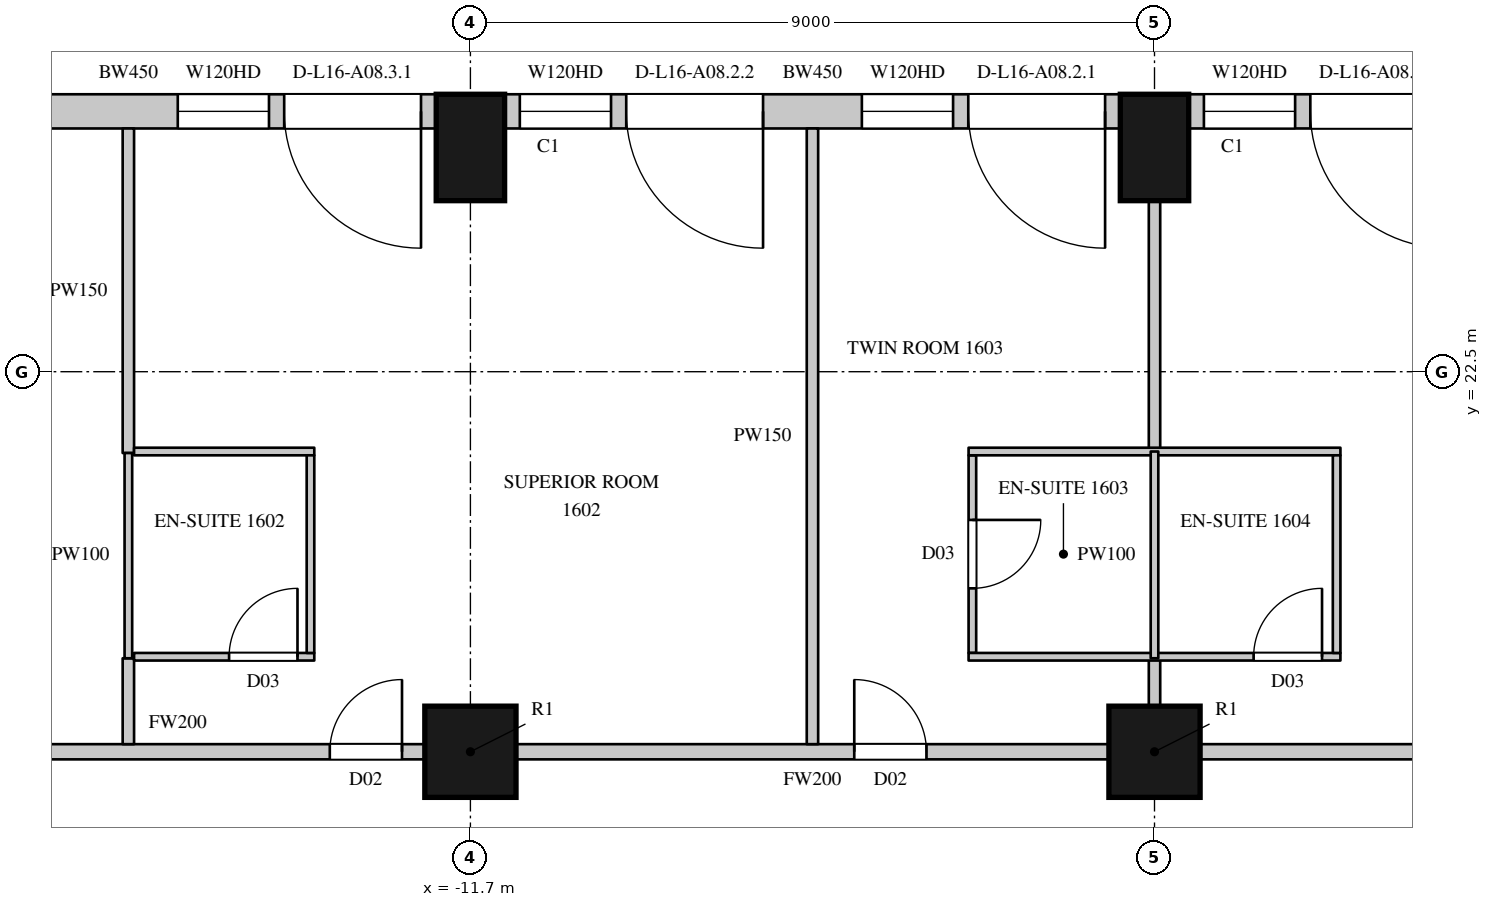
"""IFC4 building model, lengths in metres.
Left out: names, types, materials, properties, quantities, classifications, styles, units other than length and angle.
Written with IfcOpenShell. Run it as: python <this file> out.ifc"""

import sys

from ifc_helpers import new_model, si_unit, direction, frame, frame_2d, origin, origin_2d, place, context, subcontext, project, spatial, rectangle, circle, extrude, element, fill, save


model = new_model("IFC4")
c1 = context("Model", 3, precision=1e-05, world=origin(), true_north=direction((0.0, 1.0)))
c2 = subcontext(c1, "Body", "Model", "MODEL_VIEW")
j1 = project(units=[si_unit("LENGTHUNIT", "METRE"), si_unit("PLANEANGLEUNIT", "RADIAN")], contexts=[c1])
p1 = place(None, origin())
s1 = spatial("IfcSite", under=j1, at=p1, CompositionType="ELEMENT")
p2 = place(p1, origin())
s2 = spatial("IfcBuilding", under=s1, at=p2, CompositionType="ELEMENT")
p3 = place(p2, frame((0.0, 0.0, 87.9)))
s3 = spatial("IfcBuildingStorey", under=s2, at=p3, CompositionType="ELEMENT", Elevation=87.9)
for number, where, z_axis, x_axis in (
    (1, (-2.7, 25.45, 0.0), (0.0, 0.0, 1.0), (-1.0, 0.0, 0.0)),
    (2, (-11.7, 25.45, 0.0), (0.0, 0.0, 1.0), (-1.0, 0.0, 0.0)),
):
    element("IfcColumn", number, at=place(p3, frame(where, z_axis=z_axis, x_axis=x_axis)), inside=s3, PredefinedType="COLUMN", context=c2, shape_type="SweptSolid", body=[
        extrude(rectangle(XDim=0.9, YDim=1.4, at=origin_2d()), origin(), (0.0, 0.0, 1.0), 3.6),
    ])
for number, where, z_axis, x_axis in (
    (3, (-11.7, 17.5, 0.0), (0.0, 0.0, 1.0), (1.0, 0.0, 0.0)),
    (4, (-2.7, 17.5, 0.0), (0.0, 0.0, 1.0), (1.0, 0.0, 0.0)),
):
    element("IfcColumn", number, at=place(p3, frame(where, z_axis=z_axis, x_axis=x_axis)), inside=s3, PredefinedType="COLUMN", context=c2, shape_type="SweptSolid", body=[
        extrude(circle(Radius=0.6, at=origin_2d()), origin(), (0.0, 0.0, 1.0), 3.6),
    ])
p4 = place(p3, frame((5.85, 25.925, 0.0), z_axis=(0.0, 0.0, 1.0), x_axis=(-1.0, 0.0, 0.0)))
e5 = element("IfcWall", 5, at=p4, inside=s3, PredefinedType="SOLIDWALL", context=c2, shape_type="SweptSolid", body=[
    extrude(rectangle(XDim=8.1, YDim=0.45, at=frame_2d((4.05, 0.0))), origin(), (0.0, 0.0, 1.0), 3.3),
])
p5 = place(p4, frame((0.2, 0.0, 0.0)))
e6 = element("IfcOpeningElement", 6, at=p5, cuts=e5, PredefinedType="OPENING", context=c2, shape_type="SweptSolid", body=[
    extrude(rectangle(XDim=1.8, YDim=2.4, at=frame_2d((0.9, 1.2))), frame((0.0, 0.235, 0.0), z_axis=(0.0, -1.0, 0.0), x_axis=(1.0, 0.0, 0.0)), (0.0, 0.0, 1.0), 0.47),
])
p6 = place(p4, frame((2.2, 0.0, 1.05)))
e7 = element("IfcOpeningElement", 7, at=p6, cuts=e5, PredefinedType="OPENING", context=c2, shape_type="SweptSolid", body=[
    extrude(rectangle(XDim=1.2, YDim=2.0, at=frame_2d((0.6, 1.0))), frame((0.0, 0.235, 0.0), z_axis=(0.0, -1.0, 0.0), x_axis=(1.0, 0.0, 0.0)), (0.0, 0.0, 1.0), 0.47),
])
p7 = place(p4, frame((4.7, 0.0, 0.0)))
e8 = element("IfcOpeningElement", 8, at=p7, cuts=e5, PredefinedType="OPENING", context=c2, shape_type="SweptSolid", body=[
    extrude(rectangle(XDim=1.8, YDim=2.4, at=frame_2d((0.9, 1.2))), frame((0.0, 0.235, 0.0), z_axis=(0.0, -1.0, 0.0), x_axis=(1.0, 0.0, 0.0)), (0.0, 0.0, 1.0), 0.47),
])
p8 = place(p4, frame((6.7, 0.0, 1.05)))
e9 = element("IfcOpeningElement", 9, at=p8, cuts=e5, PredefinedType="OPENING", context=c2, shape_type="SweptSolid", body=[
    extrude(rectangle(XDim=1.2, YDim=2.0, at=frame_2d((0.6, 1.0))), frame((0.0, 0.235, 0.0), z_axis=(0.0, -1.0, 0.0), x_axis=(1.0, 0.0, 0.0)), (0.0, 0.0, 1.0), 0.47),
])
p9 = place(p3, frame((-3.15, 25.925, 0.0), z_axis=(0.0, 0.0, 1.0), x_axis=(-1.0, 0.0, 0.0)))
e10 = element("IfcWall", 10, at=p9, inside=s3, PredefinedType="SOLIDWALL", context=c2, shape_type="SweptSolid", body=[
    extrude(rectangle(XDim=8.1, YDim=0.45, at=frame_2d((4.05, 0.0))), origin(), (0.0, 0.0, 1.0), 3.3),
])
p10 = place(p9, frame((0.2, 0.0, 0.0)))
e11 = element("IfcOpeningElement", 11, at=p10, cuts=e10, PredefinedType="OPENING", context=c2, shape_type="SweptSolid", body=[
    extrude(rectangle(XDim=1.8, YDim=2.4, at=frame_2d((0.9, 1.2))), frame((0.0, 0.235, 0.0), z_axis=(0.0, -1.0, 0.0), x_axis=(1.0, 0.0, 0.0)), (0.0, 0.0, 1.0), 0.47),
])
p11 = place(p9, frame((2.2, 0.0, 1.05)))
e12 = element("IfcOpeningElement", 12, at=p11, cuts=e10, PredefinedType="OPENING", context=c2, shape_type="SweptSolid", body=[
    extrude(rectangle(XDim=1.2, YDim=2.0, at=frame_2d((0.6, 1.0))), frame((0.0, 0.235, 0.0), z_axis=(0.0, -1.0, 0.0), x_axis=(1.0, 0.0, 0.0)), (0.0, 0.0, 1.0), 0.47),
])
p12 = place(p9, frame((4.7, 0.0, 0.0)))
e13 = element("IfcOpeningElement", 13, at=p12, cuts=e10, PredefinedType="OPENING", context=c2, shape_type="SweptSolid", body=[
    extrude(rectangle(XDim=1.8, YDim=2.4, at=frame_2d((0.9, 1.2))), frame((0.0, 0.235, 0.0), z_axis=(0.0, -1.0, 0.0), x_axis=(1.0, 0.0, 0.0)), (0.0, 0.0, 1.0), 0.47),
])
p13 = place(p9, frame((6.7, 0.0, 1.05)))
e14 = element("IfcOpeningElement", 14, at=p13, cuts=e10, PredefinedType="OPENING", context=c2, shape_type="SweptSolid", body=[
    extrude(rectangle(XDim=1.2, YDim=2.0, at=frame_2d((0.6, 1.0))), frame((0.0, 0.235, 0.0), z_axis=(0.0, -1.0, 0.0), x_axis=(1.0, 0.0, 0.0)), (0.0, 0.0, 1.0), 0.47),
])
p14 = place(p3, frame((-12.15, 25.925, 0.0), z_axis=(0.0, 0.0, 1.0), x_axis=(-1.0, 0.0, 0.0)))
e15 = element("IfcWall", 15, at=p14, inside=s3, PredefinedType="SOLIDWALL", context=c2, shape_type="SweptSolid", body=[
    extrude(rectangle(XDim=8.1, YDim=0.45, at=frame_2d((4.05, 0.0))), origin(), (0.0, 0.0, 1.0), 3.3),
])
p15 = place(p14, frame((0.2, 0.0, 0.0)))
e16 = element("IfcOpeningElement", 16, at=p15, cuts=e15, PredefinedType="OPENING", context=c2, shape_type="SweptSolid", body=[
    extrude(rectangle(XDim=1.8, YDim=2.4, at=frame_2d((0.9, 1.2))), frame((0.0, 0.235, 0.0), z_axis=(0.0, -1.0, 0.0), x_axis=(1.0, 0.0, 0.0)), (0.0, 0.0, 1.0), 0.47),
])
p16 = place(p14, frame((2.2, 0.0, 1.05)))
e17 = element("IfcOpeningElement", 17, at=p16, cuts=e15, PredefinedType="OPENING", context=c2, shape_type="SweptSolid", body=[
    extrude(rectangle(XDim=1.2, YDim=2.0, at=frame_2d((0.6, 1.0))), frame((0.0, 0.235, 0.0), z_axis=(0.0, -1.0, 0.0), x_axis=(1.0, 0.0, 0.0)), (0.0, 0.0, 1.0), 0.47),
])
p17 = place(p14, frame((5.4, 0.0, 0.0)))
e18 = element("IfcOpeningElement", 18, at=p17, cuts=e15, PredefinedType="OPENING", context=c2, shape_type="SweptSolid", body=[
    extrude(rectangle(XDim=1.8, YDim=2.4, at=frame_2d((0.9, 1.2))), frame((0.0, 0.235, 0.0), z_axis=(0.0, -1.0, 0.0), x_axis=(1.0, 0.0, 0.0)), (0.0, 0.0, 1.0), 0.47),
])
p18 = place(p3, frame((-18.8, 17.5, 0.0), z_axis=(0.0, 0.0, 1.0), x_axis=(1.0, 0.0, 0.0)))
e19 = element("IfcWall", 19, at=p18, inside=s3, PredefinedType="PARTITIONING", context=c2, shape_type="SweptSolid", body=[
    extrude(rectangle(XDim=6.5, YDim=0.2, at=frame_2d((3.25, 0.0))), origin(), (0.0, 0.0, 1.0), 2.75),
])
p19 = place(p18, frame((5.25, 0.0, 0.0)))
e20 = element("IfcOpeningElement", 20, at=p19, cuts=e19, PredefinedType="OPENING", context=c2, shape_type="SweptSolid", body=[
    extrude(rectangle(XDim=0.95, YDim=2.2, at=frame_2d((0.475, 1.1))), frame((0.0, 0.11, 0.0), z_axis=(0.0, -1.0, 0.0), x_axis=(1.0, 0.0, 0.0)), (0.0, 0.0, 1.0), 0.22),
])
p20 = place(p3, frame((-11.1, 17.5, 0.0), z_axis=(0.0, 0.0, 1.0), x_axis=(1.0, 0.0, 0.0)))
e21 = element("IfcWall", 21, at=p20, inside=s3, PredefinedType="PARTITIONING", context=c2, shape_type="SweptSolid", body=[
    extrude(rectangle(XDim=7.8, YDim=0.2, at=frame_2d((3.9, 0.0))), origin(), (0.0, 0.0, 1.0), 2.75),
])
p21 = place(p20, frame((4.45, 0.0, 0.0)))
e22 = element("IfcOpeningElement", 22, at=p21, cuts=e21, PredefinedType="OPENING", context=c2, shape_type="SweptSolid", body=[
    extrude(rectangle(XDim=0.95, YDim=2.2, at=frame_2d((0.475, 1.1))), frame((0.0, 0.11, 0.0), z_axis=(0.0, -1.0, 0.0), x_axis=(1.0, 0.0, 0.0)), (0.0, 0.0, 1.0), 0.22),
])
p22 = place(p3, frame((-2.1, 17.5, 0.0), z_axis=(0.0, 0.0, 1.0), x_axis=(1.0, 0.0, 0.0)))
e23 = element("IfcWall", 23, at=p22, inside=s3, PredefinedType="PARTITIONING", context=c2, shape_type="SweptSolid", body=[
    extrude(rectangle(XDim=7.8, YDim=0.2, at=frame_2d((3.9, 0.0))), origin(), (0.0, 0.0, 1.0), 2.75),
])
p23 = place(p22, frame((4.15, 0.0, 0.0)))
e24 = element("IfcOpeningElement", 24, at=p23, cuts=e23, PredefinedType="OPENING", context=c2, shape_type="SweptSolid", body=[
    extrude(rectangle(XDim=0.95, YDim=2.2, at=frame_2d((0.475, 1.1))), frame((0.0, 0.11, 0.0), z_axis=(0.0, -1.0, 0.0), x_axis=(1.0, 0.0, 0.0)), (0.0, 0.0, 1.0), 0.22),
])
p24 = place(p3, frame((-16.2, 17.6, 0.0), z_axis=(0.0, 0.0, 1.0), x_axis=(0.0, 1.0, 0.0)))
e25 = element("IfcWall", 25, at=p24, inside=s3, PredefinedType="PARTITIONING", context=c2, shape_type="SweptSolid", body=[
    extrude(rectangle(XDim=1.13, YDim=0.15, at=frame_2d((0.565, 0.0))), origin(), (0.0, 0.0, 1.0), 2.65),
])
p25 = place(p3, frame((-16.2, 21.43, 0.0), z_axis=(0.0, 0.0, 1.0), x_axis=(0.0, 1.0, 0.0)))
e26 = element("IfcWall", 26, at=p25, inside=s3, PredefinedType="PARTITIONING", context=c2, shape_type="SweptSolid", body=[
    extrude(rectangle(XDim=4.27, YDim=0.15, at=frame_2d((2.135, 0.0))), origin(), (0.0, 0.0, 1.0), 2.65),
])
p26 = place(p3, frame((-7.2, 17.6, 0.0), z_axis=(0.0, 0.0, 1.0), x_axis=(0.0, 1.0, 0.0)))
e27 = element("IfcWall", 27, at=p26, inside=s3, PredefinedType="PARTITIONING", context=c2, shape_type="SweptSolid", body=[
    extrude(rectangle(XDim=8.1, YDim=0.15, at=frame_2d((4.05, 0.0))), origin(), (0.0, 0.0, 1.0), 2.65),
])
p27 = place(p3, frame((-2.7, 18.1, 0.0), z_axis=(0.0, 0.0, 1.0), x_axis=(0.0, 1.0, 0.0)))
e28 = element("IfcWall", 28, at=p27, inside=s3, PredefinedType="PARTITIONING", context=c2, shape_type="SweptSolid", body=[
    extrude(rectangle(XDim=0.63, YDim=0.15, at=frame_2d((0.315, 0.0))), origin(), (0.0, 0.0, 1.0), 2.75),
])
p28 = place(p3, frame((-2.7, 21.45, 0.0), z_axis=(0.0, 0.0, 1.0), x_axis=(0.0, 1.0, 0.0)))
e29 = element("IfcWall", 29, at=p28, inside=s3, PredefinedType="PARTITIONING", context=c2, shape_type="SweptSolid", body=[
    extrude(rectangle(XDim=3.3, YDim=0.15, at=frame_2d((1.65, 0.0))), origin(), (0.0, 0.0, 1.0), 2.75),
])
p29 = place(p3, frame((-16.2, 18.73, 0.0), z_axis=(0.0, 0.0, 1.0), x_axis=(0.0, 1.0, 0.0)))
e30 = element("IfcWall", 30, at=p29, inside=s3, PredefinedType="PARTITIONING", context=c2, shape_type="SweptSolid", body=[
    extrude(rectangle(XDim=2.7, YDim=0.1, at=frame_2d((1.35, 0.0))), origin(), (0.0, 0.0, 1.0), 2.65),
])
p30 = place(p3, frame((-16.125, 18.75, 0.0), z_axis=(0.0, 0.0, 1.0), x_axis=(1.0, 0.0, 0.0)))
e31 = element("IfcWall", 31, at=p30, inside=s3, PredefinedType="PARTITIONING", context=c2, shape_type="SweptSolid", body=[
    extrude(rectangle(XDim=2.371, YDim=0.1, at=frame_2d((1.186, 0.0))), origin(), (0.0, 0.0, 1.0), 3.3),
])
p31 = place(p30, frame((1.25, 0.0, 0.0)))
e32 = element("IfcOpeningElement", 32, at=p31, cuts=e31, PredefinedType="OPENING", context=c2, shape_type="SweptSolid", body=[
    extrude(rectangle(XDim=0.9, YDim=2.2, at=frame_2d((0.45, 1.1))), frame((0.0, 0.06, 0.0), z_axis=(0.0, -1.0, 0.0), x_axis=(1.0, 0.0, 0.0)), (0.0, 0.0, 1.0), 0.12),
])
p32 = place(p3, frame((-16.125, 21.45, 0.0), z_axis=(0.0, 0.0, 1.0), x_axis=(1.0, 0.0, 0.0)))
e33 = element("IfcWall", 33, at=p32, inside=s3, PredefinedType="PARTITIONING", context=c2, shape_type="SweptSolid", body=[
    extrude(rectangle(XDim=2.371, YDim=0.1, at=frame_2d((1.186, 0.0))), origin(), (0.0, 0.0, 1.0), 3.3),
])
p33 = place(p3, frame((-13.804, 18.8, 0.0), z_axis=(0.0, 0.0, 1.0), x_axis=(0.0, 1.0, 0.0)))
e34 = element("IfcWall", 34, at=p33, inside=s3, PredefinedType="PARTITIONING", context=c2, shape_type="SweptSolid", body=[
    extrude(rectangle(XDim=2.6, YDim=0.1, at=frame_2d((1.3, 0.0))), origin(), (0.0, 0.0, 1.0), 3.3),
])
p34 = place(p3, frame((-5.096, 18.8, 0.0), z_axis=(0.0, 0.0, 1.0), x_axis=(0.0, 1.0, 0.0)))
e35 = element("IfcWall", 35, at=p34, inside=s3, PredefinedType="PARTITIONING", context=c2, shape_type="SweptSolid", body=[
    extrude(rectangle(XDim=2.6, YDim=0.1, at=frame_2d((1.3, 0.0))), origin(), (0.0, 0.0, 1.0), 3.3),
])
p35 = place(p34, frame((0.85, 0.0, 0.0)))
e36 = element("IfcOpeningElement", 36, at=p35, cuts=e35, PredefinedType="OPENING", context=c2, shape_type="SweptSolid", body=[
    extrude(rectangle(XDim=0.9, YDim=2.2, at=frame_2d((0.45, 1.1))), frame((0.0, 0.06, 0.0), z_axis=(0.0, -1.0, 0.0), x_axis=(1.0, 0.0, 0.0)), (0.0, 0.0, 1.0), 0.12),
])
p36 = place(p3, frame((-5.146, 18.75, 0.0), z_axis=(0.0, 0.0, 1.0), x_axis=(1.0, 0.0, 0.0)))
e37 = element("IfcWall", 37, at=p36, inside=s3, PredefinedType="PARTITIONING", context=c2, shape_type="SweptSolid", body=[
    extrude(rectangle(XDim=4.892, YDim=0.1, at=frame_2d((2.446, 0.0))), origin(), (0.0, 0.0, 1.0), 3.3),
])
p37 = place(p36, frame((3.75, 0.0, 0.0)))
e38 = element("IfcOpeningElement", 38, at=p37, cuts=e37, PredefinedType="OPENING", context=c2, shape_type="SweptSolid", body=[
    extrude(rectangle(XDim=0.9, YDim=2.2, at=frame_2d((0.45, 1.1))), frame((0.0, 0.06, 0.0), z_axis=(0.0, -1.0, 0.0), x_axis=(1.0, 0.0, 0.0)), (0.0, 0.0, 1.0), 0.12),
])
p38 = place(p3, frame((-5.146, 21.45, 0.0), z_axis=(0.0, 0.0, 1.0), x_axis=(1.0, 0.0, 0.0)))
e39 = element("IfcWall", 39, at=p38, inside=s3, PredefinedType="PARTITIONING", context=c2, shape_type="SweptSolid", body=[
    extrude(rectangle(XDim=4.892, YDim=0.1, at=frame_2d((2.446, 0.0))), origin(), (0.0, 0.0, 1.0), 3.3),
])
p39 = place(p3, frame((-2.7, 18.73, 0.0), z_axis=(0.0, 0.0, 1.0), x_axis=(0.0, 1.0, 0.0)))
e40 = element("IfcWall", 40, at=p39, inside=s3, PredefinedType="PARTITIONING", context=c2, shape_type="SweptSolid", body=[
    extrude(rectangle(XDim=2.72, YDim=0.1, at=frame_2d((1.36, 0.0))), origin(), (0.0, 0.0, 1.0), 2.75),
])
p40 = place(p3, frame((-0.304, 18.8, 0.0), z_axis=(0.0, 0.0, 1.0), x_axis=(0.0, 1.0, 0.0)))
e41 = element("IfcWall", 41, at=p40, inside=s3, PredefinedType="PARTITIONING", context=c2, shape_type="SweptSolid", body=[
    extrude(rectangle(XDim=2.6, YDim=0.1, at=frame_2d((1.3, 0.0))), origin(), (0.0, 0.0, 1.0), 3.3),
])
p41 = place(p7, origin())
e42 = element("IfcDoor", 42, at=p41, inside=s3, OperationType="SLIDING_TO_LEFT", PredefinedType="DOOR", context=c2, shape_type="SweptSolid", body=[
    extrude(rectangle(XDim=1.8, YDim=2.4, at=frame_2d((0.9, 1.2))), frame((0.0, 0.13, 0.0), z_axis=(0.0, -1.0, 0.0), x_axis=(1.0, 0.0, 0.0)), (0.0, 0.0, 1.0), 0.05),
])
fill(e8, e42)
p42 = place(p8, origin())
e43 = element("IfcWindow", 43, at=p42, inside=s3, PartitioningType="SINGLE_PANEL", PredefinedType="WINDOW", context=c2, shape_type="SweptSolid", body=[
    extrude(rectangle(XDim=1.2, YDim=2.0, at=frame_2d((0.6, 1.0))), frame((0.0, 0.135, 0.0), z_axis=(0.0, -1.0, 0.0), x_axis=(1.0, 0.0, 0.0)), (0.0, 0.0, 1.0), 0.06),
])
fill(e9, e43)
p43 = place(p10, origin())
e44 = element("IfcDoor", 44, at=p43, inside=s3, OperationType="SLIDING_TO_LEFT", PredefinedType="DOOR", context=c2, shape_type="SweptSolid", body=[
    extrude(rectangle(XDim=1.8, YDim=2.4, at=frame_2d((0.9, 1.2))), frame((0.0, 0.13, 0.0), z_axis=(0.0, -1.0, 0.0), x_axis=(1.0, 0.0, 0.0)), (0.0, 0.0, 1.0), 0.05),
])
fill(e11, e44)
p44 = place(p11, origin())
e45 = element("IfcWindow", 45, at=p44, inside=s3, PartitioningType="SINGLE_PANEL", PredefinedType="WINDOW", context=c2, shape_type="SweptSolid", body=[
    extrude(rectangle(XDim=1.2, YDim=2.0, at=frame_2d((0.6, 1.0))), frame((0.0, 0.135, 0.0), z_axis=(0.0, -1.0, 0.0), x_axis=(1.0, 0.0, 0.0)), (0.0, 0.0, 1.0), 0.06),
])
fill(e12, e45)
p45 = place(p12, origin())
e46 = element("IfcDoor", 46, at=p45, inside=s3, OperationType="SLIDING_TO_LEFT", PredefinedType="DOOR", context=c2, shape_type="SweptSolid", body=[
    extrude(rectangle(XDim=1.8, YDim=2.4, at=frame_2d((0.9, 1.2))), frame((0.0, 0.13, 0.0), z_axis=(0.0, -1.0, 0.0), x_axis=(1.0, 0.0, 0.0)), (0.0, 0.0, 1.0), 0.05),
])
fill(e13, e46)
p46 = place(p13, origin())
e47 = element("IfcWindow", 47, at=p46, inside=s3, PartitioningType="SINGLE_PANEL", PredefinedType="WINDOW", context=c2, shape_type="SweptSolid", body=[
    extrude(rectangle(XDim=1.2, YDim=2.0, at=frame_2d((0.6, 1.0))), frame((0.0, 0.135, 0.0), z_axis=(0.0, -1.0, 0.0), x_axis=(1.0, 0.0, 0.0)), (0.0, 0.0, 1.0), 0.06),
])
fill(e14, e47)
p47 = place(p15, origin())
e48 = element("IfcDoor", 48, at=p47, inside=s3, OperationType="SLIDING_TO_LEFT", PredefinedType="DOOR", context=c2, shape_type="SweptSolid", body=[
    extrude(rectangle(XDim=1.8, YDim=2.4, at=frame_2d((0.9, 1.2))), frame((0.0, 0.13, 0.0), z_axis=(0.0, -1.0, 0.0), x_axis=(1.0, 0.0, 0.0)), (0.0, 0.0, 1.0), 0.05),
])
fill(e16, e48)
p48 = place(p16, origin())
e49 = element("IfcWindow", 49, at=p48, inside=s3, PartitioningType="SINGLE_PANEL", PredefinedType="WINDOW", context=c2, shape_type="SweptSolid", body=[
    extrude(rectangle(XDim=1.2, YDim=2.0, at=frame_2d((0.6, 1.0))), frame((0.0, 0.135, 0.0), z_axis=(0.0, -1.0, 0.0), x_axis=(1.0, 0.0, 0.0)), (0.0, 0.0, 1.0), 0.06),
])
fill(e17, e49)
p49 = place(p19, origin())
e50 = element("IfcDoor", 50, at=p49, inside=s3, OperationType="SINGLE_SWING_RIGHT", PredefinedType="DOOR", context=c2, shape_type="SweptSolid", body=[
    extrude(rectangle(XDim=0.95, YDim=2.2, at=frame_2d((0.475, 1.1))), frame((0.0, 0.025, 0.0), z_axis=(0.0, -1.0, 0.0), x_axis=(1.0, 0.0, 0.0)), (0.0, 0.0, 1.0), 0.05),
])
fill(e20, e50)
p50 = place(p31, origin())
e51 = element("IfcDoor", 51, at=p50, inside=s3, OperationType="SINGLE_SWING_RIGHT", PredefinedType="DOOR", context=c2, shape_type="SweptSolid", body=[
    extrude(rectangle(XDim=0.9, YDim=2.2, at=frame_2d((0.45, 1.1))), frame((0.0, 0.025, 0.0), z_axis=(0.0, -1.0, 0.0), x_axis=(1.0, 0.0, 0.0)), (0.0, 0.0, 1.0), 0.05),
])
fill(e32, e51)
p51 = place(p21, origin())
e52 = element("IfcDoor", 52, at=p51, inside=s3, OperationType="SINGLE_SWING_LEFT", PredefinedType="DOOR", context=c2, shape_type="SweptSolid", body=[
    extrude(rectangle(XDim=0.95, YDim=2.2, at=frame_2d((0.475, 1.1))), frame((0.0, 0.025, 0.0), z_axis=(0.0, -1.0, 0.0), x_axis=(1.0, 0.0, 0.0)), (0.0, 0.0, 1.0), 0.05),
])
fill(e22, e52)
p52 = place(p35, origin())
e53 = element("IfcDoor", 53, at=p52, inside=s3, OperationType="SINGLE_SWING_LEFT", PredefinedType="DOOR", context=c2, shape_type="SweptSolid", body=[
    extrude(rectangle(XDim=0.9, YDim=2.2, at=frame_2d((0.45, 1.1))), frame((0.0, 0.025, 0.0), z_axis=(0.0, -1.0, 0.0), x_axis=(1.0, 0.0, 0.0)), (0.0, 0.0, 1.0), 0.05),
])
fill(e36, e53)
p53 = place(p37, origin())
e54 = element("IfcDoor", 54, at=p53, inside=s3, OperationType="SINGLE_SWING_RIGHT", PredefinedType="DOOR", context=c2, shape_type="SweptSolid", body=[
    extrude(rectangle(XDim=0.9, YDim=2.2, at=frame_2d((0.45, 1.1))), frame((0.0, 0.025, 0.0), z_axis=(0.0, -1.0, 0.0), x_axis=(1.0, 0.0, 0.0)), (0.0, 0.0, 1.0), 0.05),
])
fill(e38, e54)
save(model, sys.argv[1])
